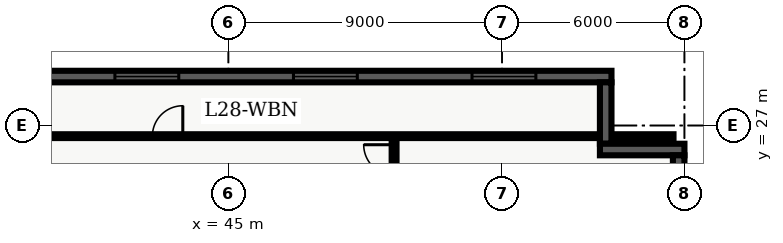
"""IFC4 building model, lengths in metres.
Left out: names, types, materials, properties, quantities, classifications, styles, units other than length and angle.
Written with IfcOpenShell. Run it as: python <this file> out.ifc"""

import sys

from ifc_helpers import new_model, entity, si_unit, converted_unit, direction, frame, origin_with_axes, origin_2d_with_axis, place, context, subcontext, project, spatial, polyline, rectangle, outline, extrude, element, fill, save


model = new_model("IFC4")
c1 = context("Model", 3, precision=1e-05, world=origin_with_axes(), true_north=direction((0.0, 1.0)))
c2 = subcontext(c1, "Body", "Model", "MODEL_VIEW")
j1 = project(units=[si_unit("LENGTHUNIT", "METRE"), converted_unit("PLANEANGLEUNIT", "DEGREE", entity("IfcPlaneAngleMeasure", 0.017), si_unit("PLANEANGLEUNIT", "RADIAN"), dimensions=[0, 0, 0, 0, 0, 0, 0])], contexts=[c1])
p1 = place(None, origin_with_axes())
s1 = spatial("IfcSite", under=j1, at=p1, CompositionType="ELEMENT")
p2 = place(p1, origin_with_axes())
s2 = spatial("IfcBuilding", under=s1, at=p2, CompositionType="ELEMENT")
p3 = place(p2, frame((0.0, 0.0, 116.4), z_axis=(0.0, 0.0, 1.0), x_axis=(1.0, 0.0, 0.0)))
s3 = spatial("IfcBuildingStorey", under=s2, at=p3, CompositionType="ELEMENT", Elevation=116.4)
p4 = place(p3, frame((50.45, 7.85, 0.0), z_axis=(0.0, 0.0, 1.0), x_axis=(0.0, 1.0, 0.0)))
e1 = element("IfcWall", 1, at=p4, inside=s3, PredefinedType="PARTITIONING", context=c2, shape_type="SweptSolid", body=[
    extrude(outline(polyline([(0.0, -0.08), (18.8, -0.08), (18.8, 0.08), (0.0, 0.08), (0.0, -0.08)])), origin_with_axes(), (0.0, 0.0, 1.0), 2.7),
])
p5 = place(p4, frame((4.344, 0.0, 0.0), z_axis=(0.0, 0.0, 1.0), x_axis=(1.0, 0.0, 0.0)))
e2 = element("IfcOpeningElement", 2, at=p5, cuts=e1, PredefinedType="OPENING", context=c2, shape_type="SweptSolid", body=[
    extrude(rectangle(XDim=1.0, YDim=0.18, at=origin_2d_with_axis()), origin_with_axes(), (0.0, 0.0, 1.0), 2.15),
])
p6 = place(p4, frame((7.776, 0.0, 0.0), z_axis=(0.0, 0.0, 1.0), x_axis=(1.0, 0.0, 0.0)))
e3 = element("IfcOpeningElement", 3, at=p6, cuts=e1, PredefinedType="OPENING", context=c2, shape_type="SweptSolid", body=[
    extrude(rectangle(XDim=1.0, YDim=0.18, at=origin_2d_with_axis()), origin_with_axes(), (0.0, 0.0, 1.0), 2.15),
])
p7 = place(p4, frame((13.071, 0.0, 0.0), z_axis=(0.0, 0.0, 1.0), x_axis=(1.0, 0.0, 0.0)))
e4 = element("IfcOpeningElement", 4, at=p7, cuts=e1, PredefinedType="OPENING", context=c2, shape_type="SweptSolid", body=[
    extrude(rectangle(XDim=1.0, YDim=0.18, at=origin_2d_with_axis()), origin_with_axes(), (0.0, 0.0, 1.0), 2.15),
])
p8 = place(p4, frame((18.018, 0.0, 0.0), z_axis=(0.0, 0.0, 1.0), x_axis=(1.0, 0.0, 0.0)))
e5 = element("IfcOpeningElement", 5, at=p8, cuts=e1, PredefinedType="OPENING", context=c2, shape_type="SweptSolid", body=[
    extrude(rectangle(XDim=1.0, YDim=0.18, at=origin_2d_with_axis()), origin_with_axes(), (0.0, 0.0, 1.0), 2.15),
])
p9 = place(p3, frame((38.76, 26.65, 0.0), z_axis=(0.0, 0.0, 1.0), x_axis=(1.0, 0.0, 0.0)))
e6 = element("IfcWall", 6, at=p9, inside=s3, PredefinedType="PARTITIONING", context=c2, shape_type="SweptSolid", body=[
    extrude(outline(polyline([(0.0, -0.062), (20.88, -0.062), (20.88, 0.062), (0.0, 0.062), (0.0, -0.062)])), origin_with_axes(), (0.0, 0.0, 1.0), 2.7),
])
p10 = place(p9, frame((4.24, 0.0, 0.0), z_axis=(0.0, 0.0, 1.0), x_axis=(1.0, 0.0, 0.0)))
e7 = element("IfcOpeningElement", 7, at=p10, cuts=e6, PredefinedType="OPENING", context=c2, shape_type="SweptSolid", body=[
    extrude(rectangle(XDim=1.0, YDim=0.145, at=origin_2d_with_axis()), origin_with_axes(), (0.0, 0.0, 1.0), 2.15),
])
p11 = place(p3, frame((38.78, 28.61, 0.0), z_axis=(0.0, 0.0, 1.0), x_axis=(1.0, 0.0, 0.0)))
e8 = element("IfcWall", 8, at=p11, inside=s3, PredefinedType="SOLIDWALL", context=c2, shape_type="SweptSolid", body=[
    extrude(outline(polyline([(0.0, -0.19), (18.82, -0.19), (18.82, 0.19), (0.0, 0.19), (0.0, -0.19)])), origin_with_axes(), (0.0, 0.0, 1.0), 3.66),
])
p12 = place(p11, frame((3.537, 0.0, 0.45), z_axis=(0.0, 0.0, 1.0), x_axis=(1.0, 0.0, 0.0)))
e9 = element("IfcOpeningElement", 9, at=p12, cuts=e8, PredefinedType="OPENING", context=c2, shape_type="SweptSolid", body=[
    extrude(rectangle(XDim=2.1, YDim=0.4, at=origin_2d_with_axis()), origin_with_axes(), (0.0, 0.0, 1.0), 2.2),
])
p13 = place(p11, frame((9.41, 0.0, 0.45), z_axis=(0.0, 0.0, 1.0), x_axis=(1.0, 0.0, 0.0)))
e10 = element("IfcOpeningElement", 10, at=p13, cuts=e8, PredefinedType="OPENING", context=c2, shape_type="SweptSolid", body=[
    extrude(rectangle(XDim=2.1, YDim=0.4, at=origin_2d_with_axis()), origin_with_axes(), (0.0, 0.0, 1.0), 2.2),
])
p14 = place(p11, frame((15.283, 0.0, 0.45), z_axis=(0.0, 0.0, 1.0), x_axis=(1.0, 0.0, 0.0)))
e11 = element("IfcOpeningElement", 11, at=p14, cuts=e8, PredefinedType="OPENING", context=c2, shape_type="SweptSolid", body=[
    extrude(rectangle(XDim=2.1, YDim=0.4, at=origin_2d_with_axis()), origin_with_axes(), (0.0, 0.0, 1.0), 2.2),
])
p15 = place(p3, frame((57.41, 28.42, 0.0), z_axis=(0.0, 0.0, 1.0), x_axis=(0.0, -1.0, 0.0)))
e12 = element("IfcWall", 12, at=p15, inside=s3, PredefinedType="SOLIDWALL", context=c2, shape_type="SweptSolid", body=[
    extrude(outline(polyline([(0.0, -0.19), (2.02, -0.19), (2.02, 0.19), (0.0, 0.19), (0.0, -0.19)])), origin_with_axes(), (0.0, 0.0, 1.0), 3.66),
])
p16 = place(p3, frame((57.22, 26.21, 0.0), z_axis=(0.0, 0.0, 1.0), x_axis=(1.0, 0.0, 0.0)))
e13 = element("IfcWall", 13, at=p16, inside=s3, PredefinedType="SOLIDWALL", context=c2, shape_type="SweptSolid", body=[
    extrude(outline(polyline([(0.0, -0.19), (2.78, -0.19), (2.78, 0.19), (0.0, 0.19), (0.0, -0.19)])), origin_with_axes(), (0.0, 0.0, 1.0), 3.66),
])
p17 = place(p3, frame((59.81, 26.02, 0.0), z_axis=(0.0, 0.0, 1.0), x_axis=(0.0, -1.0, 0.0)))
e14 = element("IfcWall", 14, at=p17, inside=s3, PredefinedType="SOLIDWALL", context=c2, shape_type="SweptSolid", body=[
    extrude(outline(polyline([(0.0, -0.19), (23.62, -0.19), (23.62, 0.19), (0.0, 0.19), (0.0, -0.19)])), origin_with_axes(), (0.0, 0.0, 1.0), 3.66),
])
p18 = place(p17, frame((20.218, 0.0, 0.45), z_axis=(0.0, 0.0, 1.0), x_axis=(1.0, 0.0, 0.0)))
e15 = element("IfcOpeningElement", 15, at=p18, cuts=e14, PredefinedType="OPENING", context=c2, shape_type="SweptSolid", body=[
    extrude(rectangle(XDim=2.1, YDim=0.4, at=origin_2d_with_axis()), origin_with_axes(), (0.0, 0.0, 1.0), 2.2),
])
p19 = place(p9, frame((4.24, 0.0, 0.0), z_axis=(0.0, 0.0, 1.0), x_axis=(1.0, 0.0, 0.0)))
e16 = element("IfcDoor", 16, at=p19, inside=s3, OperationType="SINGLE_SWING_RIGHT", PredefinedType="DOOR", context=c2, shape_type="SweptSolid", body=[
    extrude(rectangle(XDim=1.0, YDim=0.075, at=origin_2d_with_axis()), origin_with_axes(), (0.0, 0.0, 1.0), 2.15),
])
fill(e7, e16)
p20 = place(p4, frame((18.018, 0.0, 0.0), z_axis=(0.0, 0.0, 1.0), x_axis=(1.0, 0.0, 0.0)))
e17 = element("IfcDoor", 17, at=p20, inside=s3, OperationType="SINGLE_SWING_RIGHT", PredefinedType="DOOR", context=c2, shape_type="SweptSolid", body=[
    extrude(rectangle(XDim=1.0, YDim=0.09, at=origin_2d_with_axis()), origin_with_axes(), (0.0, 0.0, 1.0), 2.15),
])
fill(e5, e17)
p21 = place(p11, frame((3.537, 0.0, 0.45), z_axis=(0.0, 0.0, 1.0), x_axis=(1.0, 0.0, 0.0)))
e18 = element("IfcWindow", 18, at=p21, inside=s3, PredefinedType="WINDOW", context=c2, shape_type="SweptSolid", body=[
    extrude(rectangle(XDim=2.1, YDim=0.09, at=origin_2d_with_axis()), origin_with_axes(), (0.0, 0.0, 1.0), 2.2),
])
fill(e9, e18)
p22 = place(p11, frame((9.41, 0.0, 0.45), z_axis=(0.0, 0.0, 1.0), x_axis=(1.0, 0.0, 0.0)))
e19 = element("IfcWindow", 19, at=p22, inside=s3, PredefinedType="WINDOW", context=c2, shape_type="SweptSolid", body=[
    extrude(rectangle(XDim=2.1, YDim=0.09, at=origin_2d_with_axis()), origin_with_axes(), (0.0, 0.0, 1.0), 2.2),
])
fill(e10, e19)
p23 = place(p11, frame((15.283, 0.0, 0.45), z_axis=(0.0, 0.0, 1.0), x_axis=(1.0, 0.0, 0.0)))
e20 = element("IfcWindow", 20, at=p23, inside=s3, PredefinedType="WINDOW", context=c2, shape_type="SweptSolid", body=[
    extrude(rectangle(XDim=2.1, YDim=0.09, at=origin_2d_with_axis()), origin_with_axes(), (0.0, 0.0, 1.0), 2.2),
])
fill(e11, e20)
save(model, sys.argv[1])
